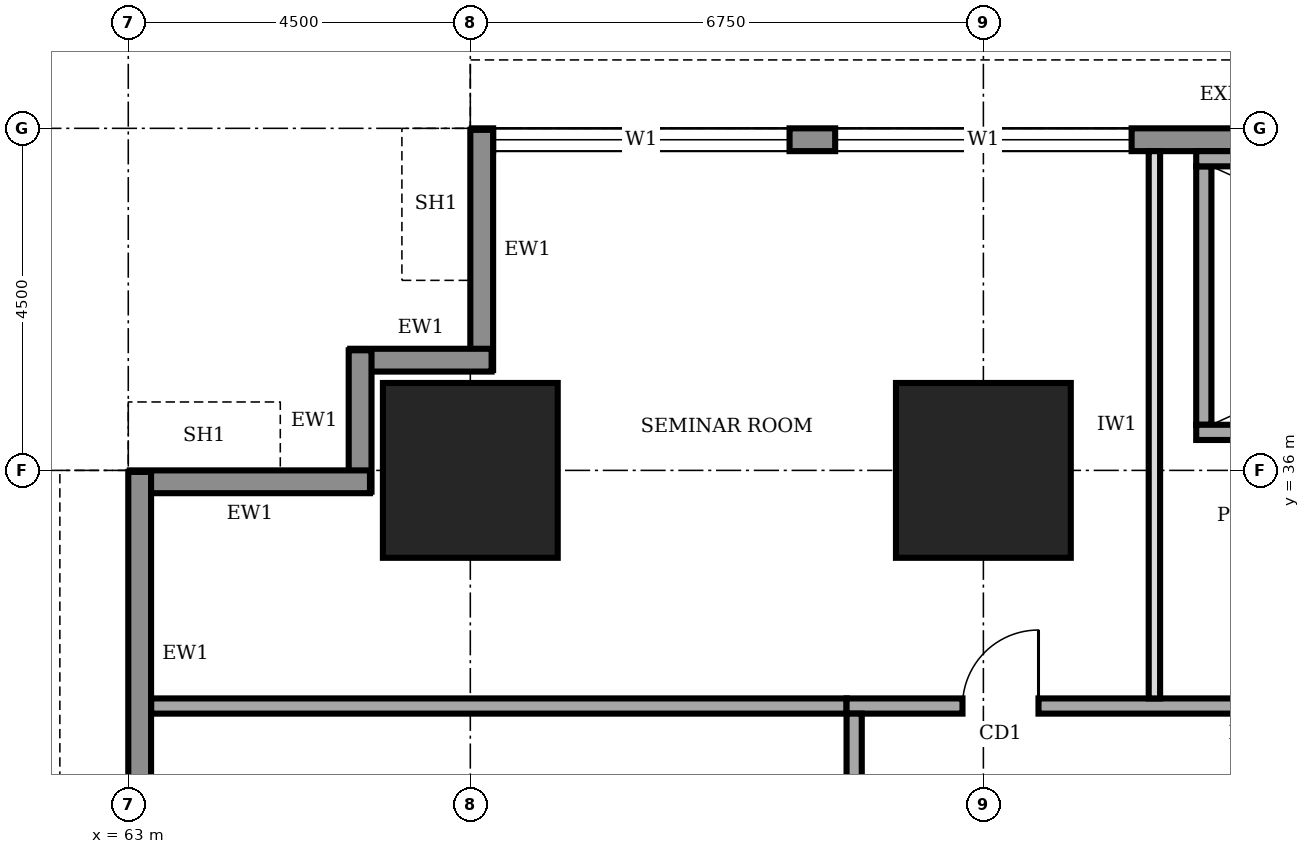
"""IFC4 building model, lengths in metres.
Left out: names, types, materials, properties, quantities, classifications, styles, units other than length and angle.
Written with IfcOpenShell. Run it as: python <this file> out.ifc"""

import sys

from ifc_helpers import new_model, si_unit, direction, frame, frame_2d, origin, origin_2d, place, context, subcontext, project, spatial, rectangle, extrude, element, fill, save


model = new_model("IFC4")
c1 = context("Model", 3, precision=1e-05, world=origin(), true_north=direction((0.0, 1.0)))
c2 = subcontext(c1, "Body", "Model", "MODEL_VIEW")
j1 = project(units=[si_unit("LENGTHUNIT", "METRE"), si_unit("PLANEANGLEUNIT", "RADIAN")], contexts=[c1])
p1 = place(None, origin())
s1 = spatial("IfcSite", under=j1, at=p1, CompositionType="ELEMENT")
p2 = place(p1, origin())
s2 = spatial("IfcBuilding", under=s1, at=p2, CompositionType="ELEMENT")
p3 = place(p2, frame((0.0, 0.0, 33.0)))
s3 = spatial("IfcBuildingStorey", under=s2, at=p3, CompositionType="ELEMENT", Elevation=33.0)
for number, where, z_axis, x_axis in (
    (1, (67.5, 36.0, 0.0), (0.0, 0.0, 1.0), (1.0, 0.0, 0.0)),
    (2, (74.25, 36.0, 0.0), (0.0, 0.0, 1.0), (1.0, 0.0, 0.0)),
):
    element("IfcColumn", number, at=place(p3, frame(where, z_axis=z_axis, x_axis=x_axis)), inside=s3, PredefinedType="COLUMN", context=c2, shape_type="SweptSolid", body=[
        extrude(rectangle(XDim=2.3, YDim=2.3, at=origin_2d()), origin(), (0.0, 0.0, 1.0), 4.0),
    ])
p4 = place(p3, frame((94.48, 40.35, 0.0), z_axis=(0.0, 0.0, 1.0), x_axis=(-1.0, 0.0, 0.0)))
e3 = element("IfcWall", 3, at=p4, inside=s3, PredefinedType="STANDARD", context=c2, shape_type="SweptSolid", body=[
    extrude(rectangle(XDim=26.96, YDim=0.3, at=frame_2d((13.48, 0.0))), origin(), (0.0, 0.0, 1.0), 3.75),
])
p5 = place(p4, frame((22.78, 0.0, 0.9)))
e4 = element("IfcOpeningElement", 4, at=p5, cuts=e3, PredefinedType="OPENING", context=c2, shape_type="SweptSolid", body=[
    extrude(rectangle(XDim=3.9, YDim=2.2, at=frame_2d((1.95, 1.1))), frame((0.0, 0.16, 0.0), z_axis=(0.0, -1.0, 0.0), x_axis=(1.0, 0.0, 0.0)), (0.0, 0.0, 1.0), 0.32),
])
p6 = place(p4, frame((18.28, 0.0, 0.9)))
e5 = element("IfcOpeningElement", 5, at=p6, cuts=e3, PredefinedType="OPENING", context=c2, shape_type="SweptSolid", body=[
    extrude(rectangle(XDim=3.9, YDim=2.2, at=frame_2d((1.95, 1.1))), frame((0.0, 0.16, 0.0), z_axis=(0.0, -1.0, 0.0), x_axis=(1.0, 0.0, 0.0)), (0.0, 0.0, 1.0), 0.32),
])
p7 = place(p4, frame((4.78, 0.0, 0.9)))
e6 = element("IfcOpeningElement", 6, at=p7, cuts=e3, PredefinedType="OPENING", context=c2, shape_type="SweptSolid", body=[
    extrude(rectangle(XDim=3.9, YDim=2.2, at=frame_2d((1.95, 1.1))), frame((0.0, 0.16, 0.0), z_axis=(0.0, -1.0, 0.0), x_axis=(1.0, 0.0, 0.0)), (0.0, 0.0, 1.0), 0.32),
])
p8 = place(p3, frame((67.65, 40.48, 0.0), z_axis=(0.0, 0.0, 1.0), x_axis=(0.0, -1.0, 0.0)))
e7 = element("IfcWall", 7, at=p8, inside=s3, PredefinedType="STANDARD", context=c2, shape_type="SweptSolid", body=[
    extrude(rectangle(XDim=3.16, YDim=0.3, at=frame_2d((1.58, 0.0))), origin(), (0.0, 0.0, 1.0), 2.85),
])
for number, where, z_axis, x_axis in (
    (8, (67.78, 37.45, 0.0), (0.0, 0.0, 1.0), (-1.0, 0.0, 0.0)),
    (9, (66.05, 37.58, 0.0), (0.0, 0.0, 1.0), (0.0, -1.0, 0.0)),
):
    element("IfcWall", number, at=place(p3, frame(where, z_axis=z_axis, x_axis=x_axis)), inside=s3, PredefinedType="STANDARD", context=c2, shape_type="SweptSolid", body=[
        extrude(rectangle(XDim=1.86, YDim=0.3, at=frame_2d((0.93, 0.0))), origin(), (0.0, 0.0, 1.0), 3.75),
    ])
p9 = place(p3, frame((66.18, 35.85, 0.0), z_axis=(0.0, 0.0, 1.0), x_axis=(-1.0, 0.0, 0.0)))
e10 = element("IfcWall", 10, at=p9, inside=s3, PredefinedType="STANDARD", context=c2, shape_type="SweptSolid", body=[
    extrude(rectangle(XDim=3.16, YDim=0.3, at=frame_2d((1.58, 0.0))), origin(), (0.0, 0.0, 1.0), 2.85),
])
p10 = place(p3, frame((63.15, 35.98, 0.0), z_axis=(0.0, 0.0, 1.0), x_axis=(0.0, -1.0, 0.0)))
e11 = element("IfcWall", 11, at=p10, inside=s3, PredefinedType="STANDARD", context=c2, shape_type="SweptSolid", body=[
    extrude(rectangle(XDim=31.46, YDim=0.3, at=frame_2d((15.73, 0.0))), origin(), (0.0, 0.0, 1.0), 3.75),
])
p11 = place(p10, frame((27.28, 0.0, 0.9)))
e12 = element("IfcOpeningElement", 12, at=p11, cuts=e11, PredefinedType="OPENING", context=c2, shape_type="SweptSolid", body=[
    extrude(rectangle(XDim=3.9, YDim=2.2, at=frame_2d((1.95, 1.1))), frame((0.0, 0.16, 0.0), z_axis=(0.0, -1.0, 0.0), x_axis=(1.0, 0.0, 0.0)), (0.0, 0.0, 1.0), 0.32),
])
p12 = place(p10, frame((22.78, 0.0, 0.9)))
e13 = element("IfcOpeningElement", 13, at=p12, cuts=e11, PredefinedType="OPENING", context=c2, shape_type="SweptSolid", body=[
    extrude(rectangle(XDim=3.9, YDim=2.2, at=frame_2d((1.95, 1.1))), frame((0.0, 0.16, 0.0), z_axis=(0.0, -1.0, 0.0), x_axis=(1.0, 0.0, 0.0)), (0.0, 0.0, 1.0), 0.32),
])
p13 = place(p10, frame((18.28, 0.0, 0.9)))
e14 = element("IfcOpeningElement", 14, at=p13, cuts=e11, PredefinedType="OPENING", context=c2, shape_type="SweptSolid", body=[
    extrude(rectangle(XDim=3.9, YDim=2.2, at=frame_2d((1.95, 1.1))), frame((0.0, 0.16, 0.0), z_axis=(0.0, -1.0, 0.0), x_axis=(1.0, 0.0, 0.0)), (0.0, 0.0, 1.0), 0.32),
])
p14 = place(p10, frame((13.78, 0.0, 0.9)))
e15 = element("IfcOpeningElement", 15, at=p14, cuts=e11, PredefinedType="OPENING", context=c2, shape_type="SweptSolid", body=[
    extrude(rectangle(XDim=3.9, YDim=2.2, at=frame_2d((1.95, 1.1))), frame((0.0, 0.16, 0.0), z_axis=(0.0, -1.0, 0.0), x_axis=(1.0, 0.0, 0.0)), (0.0, 0.0, 1.0), 0.32),
])
p15 = place(p10, frame((9.28, 0.0, 0.9)))
e16 = element("IfcOpeningElement", 16, at=p15, cuts=e11, PredefinedType="OPENING", context=c2, shape_type="SweptSolid", body=[
    extrude(rectangle(XDim=3.9, YDim=2.2, at=frame_2d((1.95, 1.1))), frame((0.0, 0.16, 0.0), z_axis=(0.0, -1.0, 0.0), x_axis=(1.0, 0.0, 0.0)), (0.0, 0.0, 1.0), 0.32),
])
p16 = place(p10, frame((4.78, 0.0, 0.9)))
e17 = element("IfcOpeningElement", 17, at=p16, cuts=e11, PredefinedType="OPENING", context=c2, shape_type="SweptSolid", body=[
    extrude(rectangle(XDim=3.9, YDim=2.2, at=frame_2d((1.95, 1.1))), frame((0.0, 0.16, 0.0), z_axis=(0.0, -1.0, 0.0), x_axis=(1.0, 0.0, 0.0)), (0.0, 0.0, 1.0), 0.32),
])
p17 = place(p3, frame((89.35, 32.9, 0.0), z_axis=(0.0, 0.0, 1.0), x_axis=(-1.0, 0.0, 0.0)))
e18 = element("IfcWall", 18, at=p17, inside=s3, PredefinedType="SOLIDWALL", context=c2, shape_type="SweptSolid", body=[
    extrude(rectangle(XDim=16.9, YDim=0.2, at=frame_2d((8.45, 0.0))), origin(), (0.0, 0.0, 1.0), 3.75),
])
p18 = place(p17, frame((14.375, 0.0, 0.0)))
e19 = element("IfcOpeningElement", 19, at=p18, cuts=e18, PredefinedType="OPENING", context=c2, shape_type="SweptSolid", body=[
    extrude(rectangle(XDim=1.0, YDim=2.1, at=frame_2d((0.5, 1.05))), frame((0.0, 0.11, 0.0), z_axis=(0.0, -1.0, 0.0), x_axis=(1.0, 0.0, 0.0)), (0.0, 0.0, 1.0), 0.22),
])
p19 = place(p17, frame((7.85, 0.0, 0.0)))
e20 = element("IfcOpeningElement", 20, at=p19, cuts=e18, PredefinedType="OPENING", context=c2, shape_type="SweptSolid", body=[
    extrude(rectangle(XDim=1.0, YDim=2.1, at=frame_2d((0.5, 1.05))), frame((0.0, 0.11, 0.0), z_axis=(0.0, -1.0, 0.0), x_axis=(1.0, 0.0, 0.0)), (0.0, 0.0, 1.0), 0.22),
])
p20 = place(p17, frame((1.325, 0.0, 0.0)))
e21 = element("IfcOpeningElement", 21, at=p20, cuts=e18, PredefinedType="OPENING", context=c2, shape_type="SweptSolid", body=[
    extrude(rectangle(XDim=1.0, YDim=2.1, at=frame_2d((0.5, 1.05))), frame((0.0, 0.11, 0.0), z_axis=(0.0, -1.0, 0.0), x_axis=(1.0, 0.0, 0.0)), (0.0, 0.0, 1.0), 0.22),
])
p21 = place(p3, frame((72.55, 32.8, 0.0), z_axis=(0.0, 0.0, 1.0), x_axis=(0.0, -1.0, 0.0)))
e22 = element("IfcWall", 22, at=p21, inside=s3, PredefinedType="SOLIDWALL", context=c2, shape_type="SweptSolid", body=[
    extrude(rectangle(XDim=23.8, YDim=0.2, at=frame_2d((11.9, 0.0))), origin(), (0.0, 0.0, 1.0), 3.75),
])
p22 = place(p21, frame((21.05, 0.0, 0.0)))
e23 = element("IfcOpeningElement", 23, at=p22, cuts=e22, PredefinedType="OPENING", context=c2, shape_type="SweptSolid", body=[
    extrude(rectangle(XDim=1.0, YDim=2.1, at=frame_2d((0.5, 1.05))), frame((0.0, 0.11, 0.0), z_axis=(0.0, -1.0, 0.0), x_axis=(1.0, 0.0, 0.0)), (0.0, 0.0, 1.0), 0.22),
])
p23 = place(p21, frame((16.55, 0.0, 0.0)))
e24 = element("IfcOpeningElement", 24, at=p23, cuts=e22, PredefinedType="OPENING", context=c2, shape_type="SweptSolid", body=[
    extrude(rectangle(XDim=1.0, YDim=2.1, at=frame_2d((0.5, 1.05))), frame((0.0, 0.11, 0.0), z_axis=(0.0, -1.0, 0.0), x_axis=(1.0, 0.0, 0.0)), (0.0, 0.0, 1.0), 0.22),
])
p24 = place(p21, frame((12.05, 0.0, 0.0)))
e25 = element("IfcOpeningElement", 25, at=p24, cuts=e22, PredefinedType="OPENING", context=c2, shape_type="SweptSolid", body=[
    extrude(rectangle(XDim=1.0, YDim=2.1, at=frame_2d((0.5, 1.05))), frame((0.0, 0.11, 0.0), z_axis=(0.0, -1.0, 0.0), x_axis=(1.0, 0.0, 0.0)), (0.0, 0.0, 1.0), 0.22),
])
p25 = place(p21, frame((7.55, 0.0, 0.0)))
e26 = element("IfcOpeningElement", 26, at=p25, cuts=e22, PredefinedType="OPENING", context=c2, shape_type="SweptSolid", body=[
    extrude(rectangle(XDim=1.0, YDim=2.1, at=frame_2d((0.5, 1.05))), frame((0.0, 0.11, 0.0), z_axis=(0.0, -1.0, 0.0), x_axis=(1.0, 0.0, 0.0)), (0.0, 0.0, 1.0), 0.22),
])
p26 = place(p21, frame((2.3, 0.0, 0.0)))
e27 = element("IfcOpeningElement", 27, at=p26, cuts=e22, PredefinedType="OPENING", context=c2, shape_type="SweptSolid", body=[
    extrude(rectangle(XDim=1.0, YDim=2.1, at=frame_2d((0.5, 1.05))), frame((0.0, 0.11, 0.0), z_axis=(0.0, -1.0, 0.0), x_axis=(1.0, 0.0, 0.0)), (0.0, 0.0, 1.0), 0.22),
])
p27 = place(p3, frame((63.3, 32.9, 0.0), z_axis=(0.0, 0.0, 1.0), x_axis=(1.0, 0.0, 0.0)))
e28 = element("IfcWall", 28, at=p27, inside=s3, PredefinedType="SOLIDWALL", context=c2, shape_type="SweptSolid", body=[
    extrude(rectangle(XDim=9.15, YDim=0.2, at=frame_2d((4.575, 0.0))), origin(), (0.0, 0.0, 1.0), 3.75),
])
p28 = place(p3, frame((76.5, 33.0, 0.0), z_axis=(0.0, 0.0, 1.0), x_axis=(0.0, 1.0, 0.0)))
e29 = element("IfcWall", 29, at=p28, inside=s3, PredefinedType="PARTITIONING", context=c2, shape_type="SweptSolid", body=[
    extrude(rectangle(XDim=7.2, YDim=0.15, at=frame_2d((3.6, 0.0))), origin(), (0.0, 0.0, 1.0), 3.75),
])
p29 = place(p3, frame((77.05, 36.5, 0.0), z_axis=(0.0, 0.0, 1.0), x_axis=(1.0, 0.0, 0.0)))
e30 = element("IfcWall", 30, at=p29, inside=s3, PredefinedType="SOLIDWALL", context=c2, shape_type="SweptSolid", body=[
    extrude(rectangle(XDim=7.9, YDim=0.2, at=frame_2d((3.95, 0.0))), origin(), (0.0, 0.0, 1.0), 3.75),
])
p30 = place(p29, frame((6.3, 0.0, 0.0)))
e31 = element("IfcOpeningElement", 31, at=p30, cuts=e30, PredefinedType="OPENING", context=c2, shape_type="SweptSolid", body=[
    extrude(rectangle(XDim=1.0, YDim=2.1, at=frame_2d((0.5, 1.05))), frame((0.0, 0.11, 0.0), z_axis=(0.0, -1.0, 0.0), x_axis=(1.0, 0.0, 0.0)), (0.0, 0.0, 1.0), 0.22),
])
p31 = place(p3, frame((77.05, 40.1, 0.0), z_axis=(0.0, 0.0, 1.0), x_axis=(1.0, 0.0, 0.0)))
e32 = element("IfcWall", 32, at=p31, inside=s3, PredefinedType="SOLIDWALL", context=c2, shape_type="SweptSolid", body=[
    extrude(rectangle(XDim=7.9, YDim=0.2, at=frame_2d((3.95, 0.0))), origin(), (0.0, 0.0, 1.0), 3.75),
])
p32 = place(p3, frame((77.15, 36.6, 0.0), z_axis=(0.0, 0.0, 1.0), x_axis=(0.0, 1.0, 0.0)))
e33 = element("IfcWall", 33, at=p32, inside=s3, PredefinedType="SOLIDWALL", context=c2, shape_type="SweptSolid", body=[
    extrude(rectangle(XDim=3.4, YDim=0.2, at=frame_2d((1.7, 0.0))), origin(), (0.0, 0.0, 1.0), 3.75),
])
p33 = place(p5, origin())
e34 = element("IfcWindow", 34, at=p33, inside=s3, PartitioningType="SINGLE_PANEL", PredefinedType="WINDOW", context=c2, shape_type="SweptSolid", body=[
    extrude(rectangle(XDim=3.9, YDim=2.2, at=frame_2d((1.95, 1.1))), frame((0.0, 0.03, 0.0), z_axis=(0.0, -1.0, 0.0), x_axis=(1.0, 0.0, 0.0)), (0.0, 0.0, 1.0), 0.06),
])
fill(e4, e34)
p34 = place(p6, origin())
e35 = element("IfcWindow", 35, at=p34, inside=s3, PartitioningType="SINGLE_PANEL", PredefinedType="WINDOW", context=c2, shape_type="SweptSolid", body=[
    extrude(rectangle(XDim=3.9, YDim=2.2, at=frame_2d((1.95, 1.1))), frame((0.0, 0.03, 0.0), z_axis=(0.0, -1.0, 0.0), x_axis=(1.0, 0.0, 0.0)), (0.0, 0.0, 1.0), 0.06),
])
fill(e5, e35)
p35 = place(p18, frame((1.0, 0.0, 0.0), z_axis=(0.0, 0.0, 1.0), x_axis=(-1.0, 0.0, 0.0)))
e36 = element("IfcDoor", 36, at=p35, inside=s3, OperationType="SINGLE_SWING_RIGHT", PredefinedType="DOOR", context=c2, shape_type="SweptSolid", body=[
    extrude(rectangle(XDim=1.0, YDim=2.1, at=frame_2d((0.5, 1.05))), frame((0.0, 0.025, 0.0), z_axis=(0.0, -1.0, 0.0), x_axis=(1.0, 0.0, 0.0)), (0.0, 0.0, 1.0), 0.05),
])
fill(e19, e36)
save(model, sys.argv[1])
